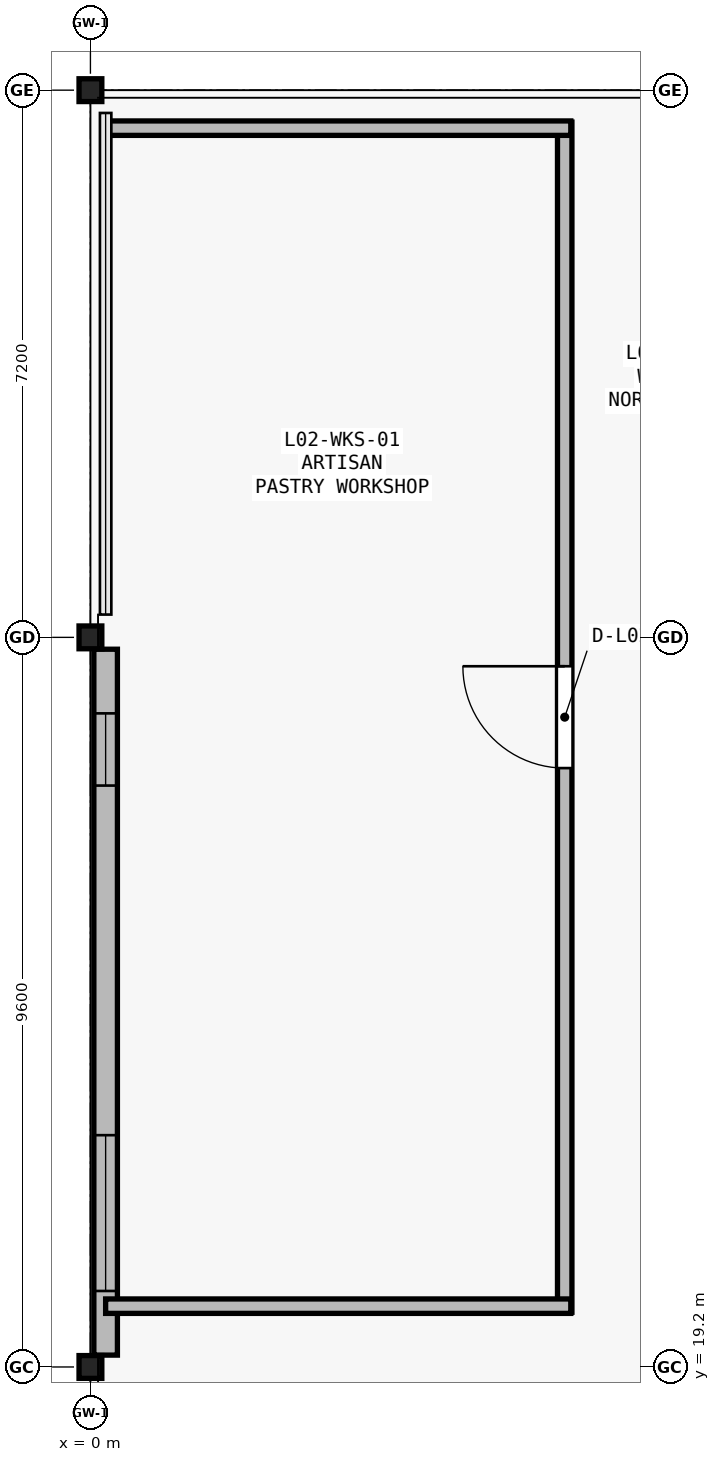
"""IFC4 building model, lengths in metres.
Left out: names, types, materials, properties, quantities, classifications, styles, units other than length and angle.
Written with IfcOpenShell. Run it as: python <this file> out.ifc"""

import sys

from ifc_helpers import new_model, si_unit, direction, frame, frame_2d, origin, origin_2d, place, context, subcontext, project, spatial, rectangle, i_section, extrude, element, fill, save


model = new_model("IFC4")
c1 = context("Model", 3, precision=1e-05, world=origin(), true_north=direction((0.0, 1.0)))
c2 = subcontext(c1, "Body", "Model", "MODEL_VIEW")
j1 = project(units=[si_unit("LENGTHUNIT", "METRE"), si_unit("PLANEANGLEUNIT", "RADIAN")], contexts=[c1])
p1 = place(None, origin())
s1 = spatial("IfcSite", under=j1, at=p1, CompositionType="ELEMENT")
p2 = place(p1, origin())
s2 = spatial("IfcBuilding", under=s1, at=p2, CompositionType="ELEMENT")
p3 = place(p2, frame((0.0, 0.0, 10.8)))
s3 = spatial("IfcBuildingStorey", under=s2, at=p3, CompositionType="ELEMENT", Elevation=10.8)
for number, where, z_axis, x_axis in (
    (1, (0.0, 19.2, 0.0), (0.0, 0.0, 1.0), (1.0, 0.0, 0.0)),
    (2, (0.0, 28.8, 0.0), (0.0, 0.0, 1.0), (1.0, 0.0, 0.0)),
    (3, (0.0, 36.0, 0.0), (0.0, 0.0, 1.0), (1.0, 0.0, 0.0)),
):
    element("IfcColumn", number, at=place(p3, frame(where, z_axis=z_axis, x_axis=x_axis)), inside=s3, PredefinedType="COLUMN", context=c2, shape_type="SweptSolid", body=[
        extrude(i_section(OverallWidth=0.3, OverallDepth=0.3, WebThickness=0.01, FlangeThickness=0.015, FilletRadius=0.018, at=origin_2d()), origin(), (0.0, 0.0, 1.0), 4.2),
    ])
p4 = place(p3, frame((0.2, 19.356, 0.0), z_axis=(0.0, 0.0, 1.0), x_axis=(0.0, 1.0, 0.0)))
e4 = element("IfcWall", 4, at=p4, inside=s3, PredefinedType="SOLIDWALL", context=c2, shape_type="SweptSolid", body=[
    extrude(rectangle(XDim=9.288, YDim=0.31, at=frame_2d((4.644, 0.0))), origin(), (0.0, 0.0, 1.0), 3.35),
])
p5 = place(p4, frame((0.844, 0.0, 0.95)))
e5 = element("IfcOpeningElement", 5, at=p5, cuts=e4, PredefinedType="OPENING", context=c2, shape_type="SweptSolid", body=[
    extrude(rectangle(XDim=2.05, YDim=1.5, at=frame_2d((1.025, 0.75))), frame((0.0, 0.165, 0.0), z_axis=(0.0, -1.0, 0.0), x_axis=(1.0, 0.0, 0.0)), (0.0, 0.0, 1.0), 0.33),
])
p6 = place(p4, frame((7.494, 0.0, 0.95)))
e6 = element("IfcOpeningElement", 6, at=p6, cuts=e4, PredefinedType="OPENING", context=c2, shape_type="SweptSolid", body=[
    extrude(rectangle(XDim=0.95, YDim=1.65, at=frame_2d((0.475, 0.825))), frame((0.0, 0.165, 0.0), z_axis=(0.0, -1.0, 0.0), x_axis=(1.0, 0.0, 0.0)), (0.0, 0.0, 1.0), 0.33),
])
p7 = place(p3, frame((6.24, 19.92, 0.0), z_axis=(0.0, 0.0, 1.0), x_axis=(0.0, 1.0, 0.0)))
e7 = element("IfcWall", 7, at=p7, inside=s3, PredefinedType="PARTITIONING", context=c2, shape_type="SweptSolid", body=[
    extrude(rectangle(XDim=15.66, YDim=0.19, at=frame_2d((7.83, 0.0))), origin(), (0.0, 0.0, 1.0), 3.72),
])
p8 = place(p7, frame((7.16, 0.0, 0.0)))
e8 = element("IfcOpeningElement", 8, at=p8, cuts=e7, PredefinedType="OPENING", context=c2, shape_type="SweptSolid", body=[
    extrude(rectangle(XDim=1.34, YDim=2.26, at=frame_2d((0.67, 1.13))), frame((0.0, 0.105, 0.0), z_axis=(0.0, -1.0, 0.0), x_axis=(1.0, 0.0, 0.0)), (0.0, 0.0, 1.0), 0.21),
])
for number, where, z_axis, x_axis in (
    (9, (0.2, 20.0, 0.0), (0.0, 0.0, 1.0), (1.0, 0.0, 0.0)),
    (10, (6.32, 35.5, 0.0), (0.0, 0.0, 1.0), (-1.0, 0.0, 0.0)),
):
    element("IfcWall", number, at=place(p3, frame(where, z_axis=z_axis, x_axis=x_axis)), inside=s3, PredefinedType="PARTITIONING", context=c2, shape_type="SweptSolid", body=[
        extrude(rectangle(XDim=6.12, YDim=0.19, at=frame_2d((3.06, 0.0))), origin(), (0.0, 0.0, 1.0), 3.72),
    ])
p9 = place(p5, origin())
e11 = element("IfcWindow", 11, at=p9, inside=s3, PartitioningType="SINGLE_PANEL", PredefinedType="WINDOW", context=c2, shape_type="SweptSolid", body=[
    extrude(rectangle(XDim=2.05, YDim=1.5, at=frame_2d((1.025, 0.75))), frame((0.0, 0.03, 0.0), z_axis=(0.0, -1.0, 0.0), x_axis=(1.0, 0.0, 0.0)), (0.0, 0.0, 1.0), 0.06),
])
fill(e5, e11)
p10 = place(p6, origin())
e12 = element("IfcWindow", 12, at=p10, inside=s3, PartitioningType="SINGLE_PANEL", PredefinedType="WINDOW", context=c2, shape_type="SweptSolid", body=[
    extrude(rectangle(XDim=0.95, YDim=1.65, at=frame_2d((0.475, 0.825))), frame((0.0, 0.03, 0.0), z_axis=(0.0, -1.0, 0.0), x_axis=(1.0, 0.0, 0.0)), (0.0, 0.0, 1.0), 0.06),
])
fill(e6, e12)
p11 = place(p8, origin())
e13 = element("IfcDoor", 13, at=p11, inside=s3, OperationType="SINGLE_SWING_RIGHT", PredefinedType="DOOR", context=c2, shape_type="SweptSolid", body=[
    extrude(rectangle(XDim=1.34, YDim=2.26, at=frame_2d((0.67, 1.13))), frame((0.0, 0.025, 0.0), z_axis=(0.0, -1.0, 0.0), x_axis=(1.0, 0.0, 0.0)), (0.0, 0.0, 1.0), 0.05),
])
fill(e8, e13)
save(model, sys.argv[1])
